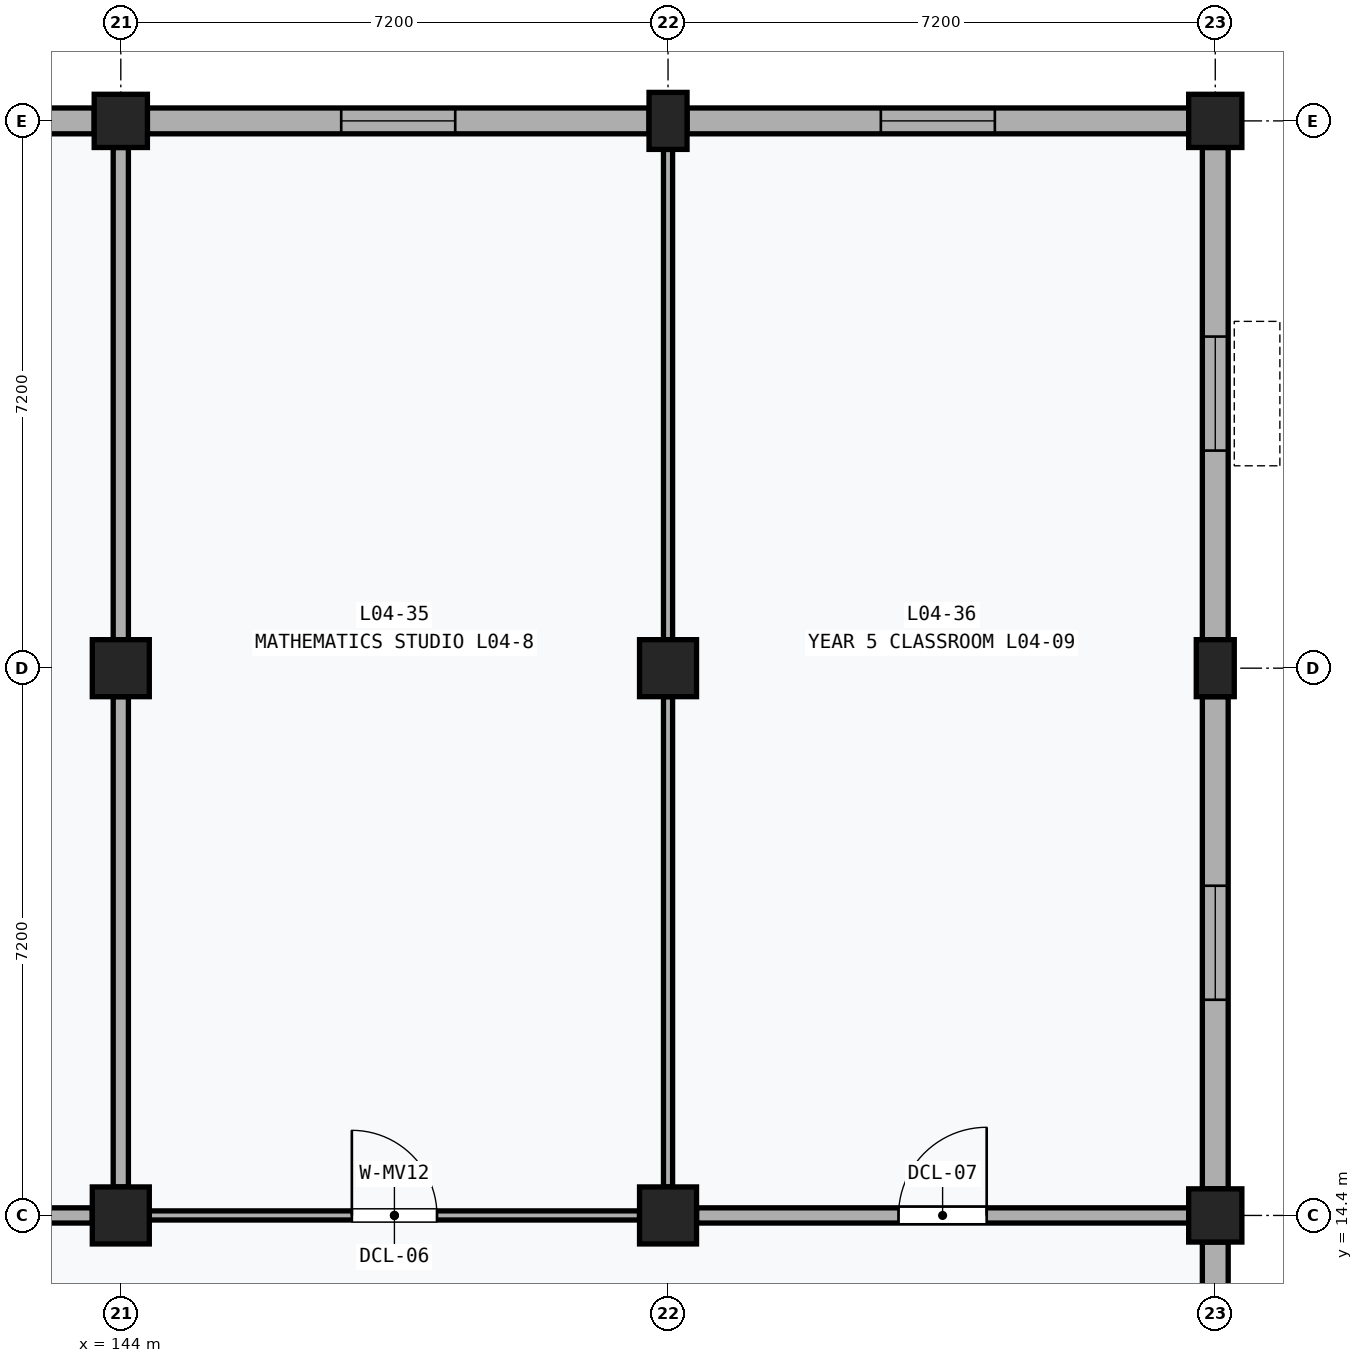
"""IFC4 building model, lengths in metres.
Left out: names, types, materials, properties, quantities, classifications, styles, units other than length and angle.
Written with IfcOpenShell. Run it as: python <this file> out.ifc"""

import sys

from ifc_helpers import new_model, si_unit, direction, frame, frame_2d, origin, origin_2d, place, context, subcontext, project, spatial, rectangle, extrude, element, fill, save


model = new_model("IFC4")
c1 = context("Model", 3, precision=1e-05, world=origin(), true_north=direction((0.0, 1.0)))
c2 = subcontext(c1, "Body", "Model", "MODEL_VIEW")
j1 = project(units=[si_unit("LENGTHUNIT", "METRE"), si_unit("PLANEANGLEUNIT", "RADIAN")], contexts=[c1])
p1 = place(None, origin())
s1 = spatial("IfcSite", under=j1, at=p1, CompositionType="ELEMENT")
p2 = place(p1, origin())
s2 = spatial("IfcBuilding", under=s1, at=p2, CompositionType="ELEMENT")
p3 = place(p2, frame((0.0, 0.0, 18.6)))
s3 = spatial("IfcBuildingStorey", under=s2, at=p3, CompositionType="ELEMENT", Elevation=18.6)
for number, where, z_axis, x_axis in (
    (1, (144.0, 14.4, 0.0), (0.0, 0.0, 1.0), (1.0, 0.0, 0.0)),
    (2, (144.0, 21.6, 0.0), (0.0, 0.0, 1.0), (1.0, 0.0, 0.0)),
):
    element("IfcColumn", number, at=place(p3, frame(where, z_axis=z_axis, x_axis=x_axis)), inside=s3, PredefinedType="COLUMN", context=c2, shape_type="SweptSolid", body=[
        extrude(rectangle(XDim=0.75, YDim=0.75, at=origin_2d()), origin(), (0.0, 0.0, 1.0), 4.0),
    ])
p4 = place(p3, frame((144.0, 28.8, 0.0), z_axis=(0.0, 0.0, 1.0), x_axis=(1.0, 0.0, 0.0)))
e3 = element("IfcColumn", 3, at=p4, inside=s3, PredefinedType="COLUMN", context=c2, shape_type="SweptSolid", body=[
    extrude(rectangle(XDim=0.7, YDim=0.7, at=origin_2d()), origin(), (0.0, 0.0, 1.0), 4.0),
])
for number, where, z_axis, x_axis in (
    (4, (151.2, 14.4, 0.0), (0.0, 0.0, 1.0), (1.0, 0.0, 0.0)),
    (5, (151.2, 21.6, 0.0), (0.0, 0.0, 1.0), (1.0, 0.0, 0.0)),
):
    element("IfcColumn", number, at=place(p3, frame(where, z_axis=z_axis, x_axis=x_axis)), inside=s3, PredefinedType="COLUMN", context=c2, shape_type="SweptSolid", body=[
        extrude(rectangle(XDim=0.75, YDim=0.75, at=origin_2d()), origin(), (0.0, 0.0, 1.0), 4.0),
    ])
p5 = place(p3, frame((151.2, 28.8, 0.0), z_axis=(0.0, 0.0, 1.0), x_axis=(1.0, 0.0, 0.0)))
e6 = element("IfcColumn", 6, at=p5, inside=s3, PredefinedType="PILASTER", context=c2, shape_type="SweptSolid", body=[
    extrude(rectangle(XDim=0.5, YDim=0.75, at=origin_2d()), origin(), (0.0, 0.0, 1.0), 4.0),
])
p6 = place(p3, frame((158.4, 14.4, 0.0), z_axis=(0.0, 0.0, 1.0), x_axis=(1.0, 0.0, 0.0)))
e7 = element("IfcColumn", 7, at=p6, inside=s3, PredefinedType="COLUMN", context=c2, shape_type="SweptSolid", body=[
    extrude(rectangle(XDim=0.7, YDim=0.7, at=origin_2d()), origin(), (0.0, 0.0, 1.0), 4.0),
])
p7 = place(p3, frame((158.4, 21.6, 0.0), z_axis=(0.0, 0.0, 1.0), x_axis=(1.0, 0.0, 0.0)))
e8 = element("IfcColumn", 8, at=p7, inside=s3, PredefinedType="PILASTER", context=c2, shape_type="SweptSolid", body=[
    extrude(rectangle(XDim=0.5, YDim=0.75, at=origin_2d()), origin(), (0.0, 0.0, 1.0), 4.0),
])
p8 = place(p3, frame((158.4, 28.8, 0.0), z_axis=(0.0, 0.0, 1.0), x_axis=(1.0, 0.0, 0.0)))
e9 = element("IfcColumn", 9, at=p8, inside=s3, PredefinedType="COLUMN", context=c2, shape_type="SweptSolid", body=[
    extrude(rectangle(XDim=0.7, YDim=0.7, at=origin_2d()), origin(), (0.0, 0.0, 1.0), 4.0),
])
p9 = place(p3, frame((137.15, 28.8, 0.0), z_axis=(0.0, 0.0, 1.0), x_axis=(1.0, 0.0, 0.0)))
e10 = element("IfcWall", 10, at=p9, inside=s3, PredefinedType="SOLIDWALL", context=c2, shape_type="SweptSolid", body=[
    extrude(rectangle(XDim=6.5, YDim=0.34, at=frame_2d((3.25, 0.0))), origin(), (0.0, 0.0, 1.0), 3.11),
])
p10 = place(p9, frame((2.5, 0.0, 1.1)))
e11 = element("IfcOpeningElement", 11, at=p10, cuts=e10, PredefinedType="OPENING", context=c2, shape_type="SweptSolid", body=[
    extrude(rectangle(XDim=1.5, YDim=1.35, at=frame_2d((0.75, 0.675))), frame((0.0, 0.182, 0.0), z_axis=(0.0, -1.0, 0.0), x_axis=(1.0, 0.0, 0.0)), (0.0, 0.0, 1.0), 0.364),
])
p11 = place(p3, frame((144.35, 28.8, 0.0), z_axis=(0.0, 0.0, 1.0), x_axis=(1.0, 0.0, 0.0)))
e12 = element("IfcWall", 12, at=p11, inside=s3, PredefinedType="SOLIDWALL", context=c2, shape_type="SweptSolid", body=[
    extrude(rectangle(XDim=6.6, YDim=0.34, at=frame_2d((3.3, 0.0))), origin(), (0.0, 0.0, 1.0), 3.11),
])
p12 = place(p11, frame((2.55, 0.0, 1.1)))
e13 = element("IfcOpeningElement", 13, at=p12, cuts=e12, PredefinedType="OPENING", context=c2, shape_type="SweptSolid", body=[
    extrude(rectangle(XDim=1.5, YDim=1.35, at=frame_2d((0.75, 0.675))), frame((0.0, 0.182, 0.0), z_axis=(0.0, -1.0, 0.0), x_axis=(1.0, 0.0, 0.0)), (0.0, 0.0, 1.0), 0.364),
])
p13 = place(p3, frame((158.4, 7.55, 0.0), z_axis=(0.0, 0.0, 1.0), x_axis=(0.0, 1.0, 0.0)))
e14 = element("IfcWall", 14, at=p13, inside=s3, PredefinedType="SOLIDWALL", context=c2, shape_type="SweptSolid", body=[
    extrude(rectangle(XDim=6.5, YDim=0.34, at=frame_2d((3.25, 0.0))), origin(), (0.0, 0.0, 1.0), 3.11),
])
p14 = place(p13, frame((2.5, 0.0, 1.1)))
e15 = element("IfcOpeningElement", 15, at=p14, cuts=e14, PredefinedType="OPENING", context=c2, shape_type="SweptSolid", body=[
    extrude(rectangle(XDim=1.5, YDim=1.35, at=frame_2d((0.75, 0.675))), frame((0.0, 0.182, 0.0), z_axis=(0.0, -1.0, 0.0), x_axis=(1.0, 0.0, 0.0)), (0.0, 0.0, 1.0), 0.364),
])
p15 = place(p3, frame((158.4, 14.75, 0.0), z_axis=(0.0, 0.0, 1.0), x_axis=(0.0, 1.0, 0.0)))
e16 = element("IfcWall", 16, at=p15, inside=s3, PredefinedType="SOLIDWALL", context=c2, shape_type="SweptSolid", body=[
    extrude(rectangle(XDim=6.475, YDim=0.34, at=frame_2d((3.238, 0.0))), origin(), (0.0, 0.0, 1.0), 3.11),
])
p16 = place(p15, frame((2.488, 0.0, 1.1)))
e17 = element("IfcOpeningElement", 17, at=p16, cuts=e16, PredefinedType="OPENING", context=c2, shape_type="SweptSolid", body=[
    extrude(rectangle(XDim=1.5, YDim=1.35, at=frame_2d((0.75, 0.675))), frame((0.0, 0.182, 0.0), z_axis=(0.0, -1.0, 0.0), x_axis=(1.0, 0.0, 0.0)), (0.0, 0.0, 1.0), 0.364),
])
p17 = place(p3, frame((151.45, 28.8, 0.0), z_axis=(0.0, 0.0, 1.0), x_axis=(1.0, 0.0, 0.0)))
e18 = element("IfcWall", 18, at=p17, inside=s3, PredefinedType="SOLIDWALL", context=c2, shape_type="SweptSolid", body=[
    extrude(rectangle(XDim=6.6, YDim=0.34, at=frame_2d((3.3, 0.0))), origin(), (0.0, 0.0, 1.0), 3.11),
])
p18 = place(p17, frame((2.55, 0.0, 1.1)))
e19 = element("IfcOpeningElement", 19, at=p18, cuts=e18, PredefinedType="OPENING", context=c2, shape_type="SweptSolid", body=[
    extrude(rectangle(XDim=1.5, YDim=1.35, at=frame_2d((0.75, 0.675))), frame((0.0, 0.182, 0.0), z_axis=(0.0, -1.0, 0.0), x_axis=(1.0, 0.0, 0.0)), (0.0, 0.0, 1.0), 0.364),
])
p19 = place(p3, frame((158.4, 21.975, 0.0), z_axis=(0.0, 0.0, 1.0), x_axis=(0.0, 1.0, 0.0)))
e20 = element("IfcWall", 20, at=p19, inside=s3, PredefinedType="SOLIDWALL", context=c2, shape_type="SweptSolid", body=[
    extrude(rectangle(XDim=6.475, YDim=0.34, at=frame_2d((3.237, 0.0))), origin(), (0.0, 0.0, 1.0), 3.11),
])
p20 = place(p19, frame((2.488, 0.0, 1.1)))
e21 = element("IfcOpeningElement", 21, at=p20, cuts=e20, PredefinedType="OPENING", context=c2, shape_type="SweptSolid", body=[
    extrude(rectangle(XDim=1.5, YDim=1.35, at=frame_2d((0.75, 0.675))), frame((0.0, 0.182, 0.0), z_axis=(0.0, -1.0, 0.0), x_axis=(1.0, 0.0, 0.0)), (0.0, 0.0, 1.0), 0.364),
])
p21 = place(p3, frame((137.175, 14.4, 0.0), z_axis=(0.0, 0.0, 1.0), x_axis=(1.0, 0.0, 0.0)))
e22 = element("IfcWall", 22, at=p21, inside=s3, PredefinedType="PARTITIONING", context=c2, shape_type="SweptSolid", body=[
    extrude(rectangle(XDim=6.45, YDim=0.2, at=frame_2d((3.225, 0.0))), origin(), (0.0, 0.0, 1.0), 2.97),
])
p22 = place(p21, frame((2.685, 0.0, 0.0)))
e23 = element("IfcOpeningElement", 23, at=p22, cuts=e22, PredefinedType="OPENING", context=c2, shape_type="SweptSolid", body=[
    extrude(rectangle(XDim=1.08, YDim=2.18, at=frame_2d((0.54, 1.09))), frame((0.0, 0.112, 0.0), z_axis=(0.0, -1.0, 0.0), x_axis=(1.0, 0.0, 0.0)), (0.0, 0.0, 1.0), 0.224),
])
p23 = place(p3, frame((144.0, 14.775, 0.0), z_axis=(0.0, 0.0, 1.0), x_axis=(0.0, 1.0, 0.0)))
e24 = element("IfcWall", 24, at=p23, inside=s3, PredefinedType="PARTITIONING", context=c2, shape_type="SweptSolid", body=[
    extrude(rectangle(XDim=6.45, YDim=0.2, at=frame_2d((3.225, 0.0))), origin(), (0.0, 0.0, 1.0), 2.97),
])
p24 = place(p3, frame((144.0, 21.975, 0.0), z_axis=(0.0, 0.0, 1.0), x_axis=(0.0, 1.0, 0.0)))
e25 = element("IfcWall", 25, at=p24, inside=s3, PredefinedType="PARTITIONING", context=c2, shape_type="SweptSolid", body=[
    extrude(rectangle(XDim=6.475, YDim=0.2, at=frame_2d((3.237, 0.0))), origin(), (0.0, 0.0, 1.0), 2.97),
])
p25 = place(p3, frame((144.375, 14.4, 0.0), z_axis=(0.0, 0.0, 1.0), x_axis=(1.0, 0.0, 0.0)))
e26 = element("IfcWall", 26, at=p25, inside=s3, PredefinedType="MOVABLE", context=c2, shape_type="SweptSolid", body=[
    extrude(rectangle(XDim=6.45, YDim=0.12, at=frame_2d((3.225, 0.0))), origin(), (0.0, 0.0, 1.0), 2.97),
])
p26 = place(p25, frame((2.665, 0.0, 0.0)))
e27 = element("IfcOpeningElement", 27, at=p26, cuts=e26, PredefinedType="OPENING", context=c2, shape_type="SweptSolid", body=[
    extrude(rectangle(XDim=1.12, YDim=2.2, at=frame_2d((0.56, 1.1))), frame((0.0, 0.072, 0.0), z_axis=(0.0, -1.0, 0.0), x_axis=(1.0, 0.0, 0.0)), (0.0, 0.0, 1.0), 0.144),
])
p27 = place(p3, frame((151.2, 14.775, 0.0), z_axis=(0.0, 0.0, 1.0), x_axis=(0.0, 1.0, 0.0)))
e28 = element("IfcWall", 28, at=p27, inside=s3, PredefinedType="MOVABLE", context=c2, shape_type="SweptSolid", body=[
    extrude(rectangle(XDim=6.45, YDim=0.12, at=frame_2d((3.225, 0.0))), origin(), (0.0, 0.0, 1.0), 2.97),
])
p28 = place(p3, frame((151.2, 21.975, 0.0), z_axis=(0.0, 0.0, 1.0), x_axis=(0.0, 1.0, 0.0)))
e29 = element("IfcWall", 29, at=p28, inside=s3, PredefinedType="MOVABLE", context=c2, shape_type="SweptSolid", body=[
    extrude(rectangle(XDim=6.45, YDim=0.12, at=frame_2d((3.225, 0.0))), origin(), (0.0, 0.0, 1.0), 2.97),
])
p29 = place(p3, frame((151.575, 14.4, 0.0), z_axis=(0.0, 0.0, 1.0), x_axis=(1.0, 0.0, 0.0)))
e30 = element("IfcWall", 30, at=p29, inside=s3, PredefinedType="PARTITIONING", context=c2, shape_type="SweptSolid", body=[
    extrude(rectangle(XDim=6.475, YDim=0.2, at=frame_2d((3.238, 0.0))), origin(), (0.0, 0.0, 1.0), 2.97),
])
p30 = place(p29, frame((2.657, 0.0, 0.0)))
e31 = element("IfcOpeningElement", 31, at=p30, cuts=e30, PredefinedType="OPENING", context=c2, shape_type="SweptSolid", body=[
    extrude(rectangle(XDim=1.16, YDim=2.22, at=frame_2d((0.58, 1.11))), frame((0.0, 0.112, 0.0), z_axis=(0.0, -1.0, 0.0), x_axis=(1.0, 0.0, 0.0)), (0.0, 0.0, 1.0), 0.224),
])
p31 = place(p12, origin())
e32 = element("IfcWindow", 32, at=p31, inside=s3, PartitioningType="SINGLE_PANEL", PredefinedType="WINDOW", context=c2, shape_type="SweptSolid", body=[
    extrude(rectangle(XDim=1.5, YDim=1.35, at=frame_2d((0.75, 0.675))), frame((0.0, 0.03, 0.0), z_axis=(0.0, -1.0, 0.0), x_axis=(1.0, 0.0, 0.0)), (0.0, 0.0, 1.0), 0.06),
])
fill(e13, e32)
p32 = place(p16, origin())
e33 = element("IfcWindow", 33, at=p32, inside=s3, PartitioningType="SINGLE_PANEL", PredefinedType="WINDOW", context=c2, shape_type="SweptSolid", body=[
    extrude(rectangle(XDim=1.5, YDim=1.35, at=frame_2d((0.75, 0.675))), frame((0.0, 0.03, 0.0), z_axis=(0.0, -1.0, 0.0), x_axis=(1.0, 0.0, 0.0)), (0.0, 0.0, 1.0), 0.06),
])
fill(e17, e33)
p33 = place(p18, origin())
e34 = element("IfcWindow", 34, at=p33, inside=s3, PartitioningType="SINGLE_PANEL", PredefinedType="WINDOW", context=c2, shape_type="SweptSolid", body=[
    extrude(rectangle(XDim=1.5, YDim=1.35, at=frame_2d((0.75, 0.675))), frame((0.0, 0.03, 0.0), z_axis=(0.0, -1.0, 0.0), x_axis=(1.0, 0.0, 0.0)), (0.0, 0.0, 1.0), 0.06),
])
fill(e19, e34)
p34 = place(p20, origin())
e35 = element("IfcWindow", 35, at=p34, inside=s3, PartitioningType="SINGLE_PANEL", PredefinedType="WINDOW", context=c2, shape_type="SweptSolid", body=[
    extrude(rectangle(XDim=1.5, YDim=1.35, at=frame_2d((0.75, 0.675))), frame((0.0, 0.03, 0.0), z_axis=(0.0, -1.0, 0.0), x_axis=(1.0, 0.0, 0.0)), (0.0, 0.0, 1.0), 0.06),
])
fill(e21, e35)
p35 = place(p26, origin())
e36 = element("IfcDoor", 36, at=p35, inside=s3, OperationType="SINGLE_SWING_LEFT", PredefinedType="DOOR", context=c2, shape_type="SweptSolid", body=[
    extrude(rectangle(XDim=1.12, YDim=2.2, at=frame_2d((0.56, 1.1))), frame((0.0, 0.025, 0.0), z_axis=(0.0, -1.0, 0.0), x_axis=(1.0, 0.0, 0.0)), (0.0, 0.0, 1.0), 0.05),
])
fill(e27, e36)
p36 = place(p30, origin())
e37 = element("IfcDoor", 37, at=p36, inside=s3, OperationType="SINGLE_SWING_RIGHT", PredefinedType="DOOR", context=c2, shape_type="SweptSolid", body=[
    extrude(rectangle(XDim=1.16, YDim=2.22, at=frame_2d((0.58, 1.11))), frame((0.0, 0.025, 0.0), z_axis=(0.0, -1.0, 0.0), x_axis=(1.0, 0.0, 0.0)), (0.0, 0.0, 1.0), 0.05),
])
fill(e31, e37)
save(model, sys.argv[1])
